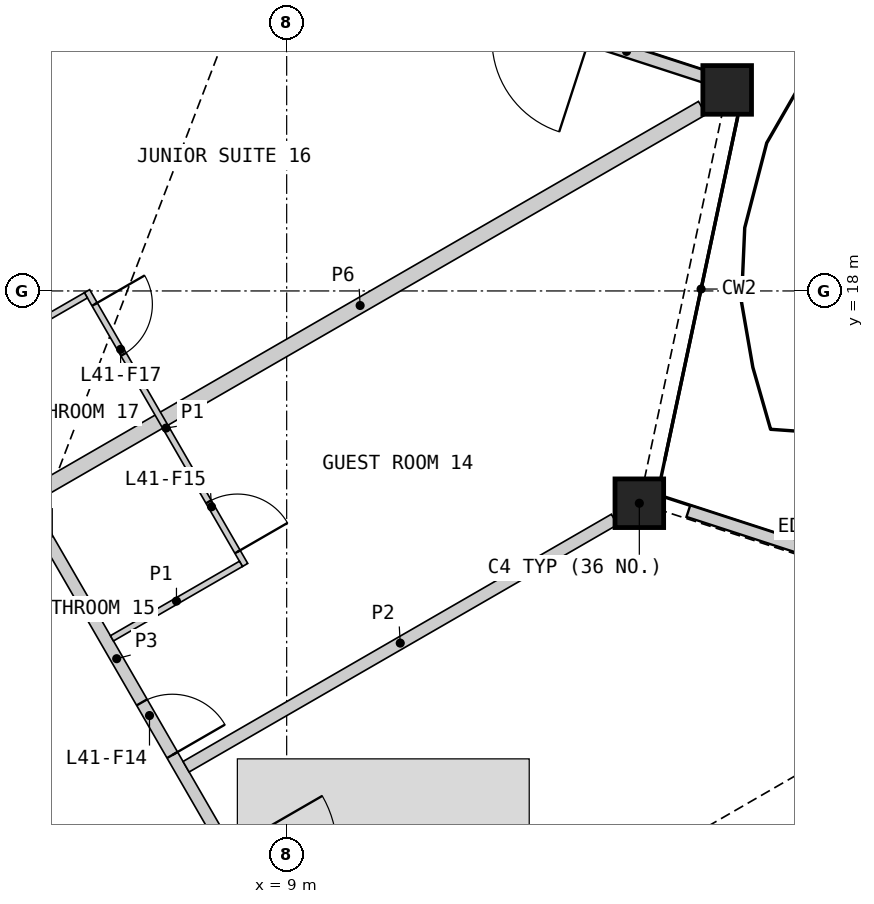
"""IFC4 building model, lengths in metres.
Left out: names, types, materials, properties, quantities, classifications, styles, units other than length and angle.
Written with IfcOpenShell. Run it as: python <this file> out.ifc"""

import sys

from ifc_helpers import new_model, si_unit, direction, frame, frame_2d, origin, origin_2d, place, context, subcontext, project, spatial, rectangle, hollow_rectangle, extrude, element, fill, save


model = new_model("IFC4")
c1 = context("Model", 3, precision=1e-05, world=origin(), true_north=direction((0.0, 1.0)))
c2 = subcontext(c1, "Body", "Model", "MODEL_VIEW")
j1 = project(units=[si_unit("LENGTHUNIT", "METRE"), si_unit("PLANEANGLEUNIT", "RADIAN")], contexts=[c1])
p1 = place(None, origin())
s1 = spatial("IfcSite", under=j1, at=p1, CompositionType="ELEMENT")
p2 = place(p1, origin())
s2 = spatial("IfcBuilding", under=s1, at=p2, CompositionType="ELEMENT")
p3 = place(p2, frame((0.0, 0.0, 190.8)))
s3 = spatial("IfcBuildingStorey", under=s2, at=p3, CompositionType="ELEMENT", Elevation=190.8)
for number, where, z_axis, x_axis in (
    (1, (14.8, 14.508, 0.0), (0.0, 0.0, 1.0), (1.0, 0.0, 0.0)),
    (2, (16.245, 21.306, 0.0), (0.0, 0.0, 1.0), (1.0, 0.0, 0.0)),
):
    element("IfcColumn", number, at=place(p3, frame(where, z_axis=z_axis, x_axis=x_axis)), inside=s3, PredefinedType="COLUMN", context=c2, shape_type="SweptSolid", body=[
        extrude(hollow_rectangle(XDim=0.8, YDim=0.8, WallThickness=0.05, at=origin_2d()), origin(), (0.0, 0.0, 1.0), 3.6),
    ])
p4 = place(p3, frame((21.102, 12.593, 0.0), z_axis=(0.0, 0.0, 1.0), x_axis=(-0.951059834965, 0.309006780371, 0.0)))
e3 = element("IfcWall", 3, at=p4, inside=s3, PredefinedType="SOLIDWALL", context=c2, shape_type="SweptSolid", body=[
    extrude(rectangle(XDim=5.779, YDim=0.2, at=frame_2d((2.889, 0.0))), origin(), (0.0, 0.0, 1.0), 2.701),
])
p5 = place(p4, frame((2.089, 0.0, 0.0)))
e4 = element("IfcOpeningElement", 4, at=p5, cuts=e3, PredefinedType="OPENING", context=c2, shape_type="SweptSolid", body=[
    extrude(rectangle(XDim=1.6, YDim=2.4, at=frame_2d((0.8, 1.2))), frame((0.0, 0.11, 0.0), z_axis=(0.0, -1.0, 0.0), x_axis=(1.0, 0.0, 0.0)), (0.0, 0.0, 1.0), 0.22),
])
p6 = place(p3, frame((15.963, 21.493, 0.0), z_axis=(0.0, 0.0, 1.0), x_axis=(-0.951059834965, 0.309006780371, 0.0)))
e5 = element("IfcWall", 5, at=p6, inside=s3, PredefinedType="SOLIDWALL", context=c2, shape_type="SweptSolid", body=[
    extrude(rectangle(XDim=5.779, YDim=0.2, at=frame_2d((2.889, 0.0))), origin(), (0.0, 0.0, 1.0), 2.701),
])
p7 = place(p6, frame((2.089, 0.0, 0.0)))
e6 = element("IfcOpeningElement", 6, at=p7, cuts=e5, PredefinedType="OPENING", context=c2, shape_type="SweptSolid", body=[
    extrude(rectangle(XDim=1.6, YDim=2.4, at=frame_2d((0.8, 1.2))), frame((0.0, 0.11, 0.0), z_axis=(0.0, -1.0, 0.0), x_axis=(1.0, 0.0, 0.0)), (0.0, 0.0, 1.0), 0.22),
])
p8 = place(p3, frame((6.875, 5.24, 0.0), z_axis=(0.0, 0.0, 1.0), x_axis=(-0.499997217876, 0.866027010039, 0.0)))
e7 = element("IfcWall", 7, at=p8, inside=s3, PredefinedType="SHEAR", context=c2, shape_type="SweptSolid", body=[
    extrude(rectangle(XDim=13.101, YDim=0.75, at=frame_2d((6.551, 0.0))), origin(), (0.0, 0.0, 1.0), 3.25),
])
p9 = place(p3, frame((4.582, 14.512, 0.0), z_axis=(0.0, 0.0, 1.0), x_axis=(0.866027263711, 0.4999967785, 0.0)))
e8 = element("IfcWall", 8, at=p9, inside=s3, PredefinedType="PARTITIONING", context=c2, shape_type="SweptSolid", body=[
    extrude(rectangle(XDim=12.994, YDim=0.25, at=frame_2d((6.497, 0.0))), origin(), (0.0, 0.0, 1.0), 2.404),
])
p10 = place(p3, frame((5.038, 13.972, 0.0), z_axis=(0.0, 0.0, 1.0), x_axis=(0.50000393355, -0.866023132736, 0.0)))
e9 = element("IfcWall", 9, at=p10, inside=s3, PredefinedType="PARTITIONING", context=c2, shape_type="SweptSolid", body=[
    extrude(rectangle(XDim=9.335, YDim=0.2, at=frame_2d((4.667, 0.0))), origin(), (0.0, 0.0, 1.0), 3.25),
])
p11 = place(p10, frame((5.979, 0.0, 0.0)))
e10 = element("IfcOpeningElement", 10, at=p11, cuts=e9, PredefinedType="OPENING", context=c2, shape_type="SweptSolid", body=[
    extrude(rectangle(XDim=1.8, YDim=2.1, at=frame_2d((0.9, 1.05))), frame((0.0, 0.11, 0.0), z_axis=(0.0, -1.0, 0.0), x_axis=(1.0, 0.0, 0.0)), (0.0, 0.0, 1.0), 0.22),
])
p12 = place(p10, frame((3.163, 0.0, 0.0)))
e11 = element("IfcOpeningElement", 11, at=p12, cuts=e9, PredefinedType="OPENING", context=c2, shape_type="SweptSolid", body=[
    extrude(rectangle(XDim=1.0, YDim=2.1, at=frame_2d((0.5, 1.05))), frame((0.0, 0.11, 0.0), z_axis=(0.0, -1.0, 0.0), x_axis=(1.0, 0.0, 0.0)), (0.0, 0.0, 1.0), 0.22),
])
p13 = place(p3, frame((2.028, 19.374, 0.0), z_axis=(0.0, 0.0, 1.0), x_axis=(0.651304244859, 0.758816697647, 0.0)))
e12 = element("IfcWall", 12, at=p13, inside=s3, PredefinedType="PARTITIONING", context=c2, shape_type="SweptSolid", body=[
    extrude(rectangle(XDim=13.795, YDim=0.2, at=frame_2d((6.897, 0.0))), origin(), (0.0, 0.0, 1.0), 2.404),
])
p14 = place(p3, frame((7.346, 10.175, 0.0), z_axis=(0.0, 0.0, 1.0), x_axis=(0.86602913801, 0.499993532075, 0.0)))
e13 = element("IfcWall", 13, at=p14, inside=s3, PredefinedType="PARTITIONING", context=c2, shape_type="SweptSolid", body=[
    extrude(rectangle(XDim=8.134, YDim=0.2, at=frame_2d((4.067, 0.0))), origin(), (0.0, 0.0, 1.0), 2.404),
])
p15 = place(p3, frame((5.717, 17.996, 0.0), z_axis=(0.0, 0.0, 1.0), x_axis=(0.500027264788, -0.866009661879, 0.0)))
e14 = element("IfcWall", 14, at=p15, inside=s3, PredefinedType="PARTITIONING", context=c2, shape_type="SweptSolid", body=[
    extrude(rectangle(XDim=5.2, YDim=0.1, at=frame_2d((2.6, 0.0))), origin(), (0.0, 0.0, 1.0), 2.404),
])
p16 = place(p15, frame((4.0, 0.0, 0.0)))
e15 = element("IfcOpeningElement", 15, at=p16, cuts=e14, PredefinedType="OPENING", context=c2, shape_type="SweptSolid", body=[
    extrude(rectangle(XDim=0.95, YDim=2.1, at=frame_2d((0.475, 1.05))), frame((0.0, 0.06, 0.0), z_axis=(0.0, -1.0, 0.0), x_axis=(1.0, 0.0, 0.0)), (0.0, 0.0, 1.0), 0.12),
])
p17 = place(p15, frame((0.25, 0.0, 0.0)))
e16 = element("IfcOpeningElement", 16, at=p17, cuts=e14, PredefinedType="OPENING", context=c2, shape_type="SweptSolid", body=[
    extrude(rectangle(XDim=0.95, YDim=2.1, at=frame_2d((0.475, 1.05))), frame((0.0, 0.06, 0.0), z_axis=(0.0, -1.0, 0.0), x_axis=(1.0, 0.0, 0.0)), (0.0, 0.0, 1.0), 0.12),
])
p18 = place(p3, frame((3.576, 16.703, 0.0), z_axis=(0.0, 0.0, 1.0), x_axis=(0.866057815567, 0.499943856944, 0.0)))
e17 = element("IfcWall", 17, at=p18, inside=s3, PredefinedType="PARTITIONING", context=c2, shape_type="SweptSolid", body=[
    extrude(rectangle(XDim=2.45, YDim=0.1, at=frame_2d((1.225, 0.0))), origin(), (0.0, 0.0, 1.0), 2.404),
])
p19 = place(p3, frame((6.126, 12.286, 0.0), z_axis=(0.0, 0.0, 1.0), x_axis=(0.866014668023, 0.500018594424, 0.0)))
e18 = element("IfcWall", 18, at=p19, inside=s3, PredefinedType="PARTITIONING", context=c2, shape_type="SweptSolid", body=[
    extrude(rectangle(XDim=2.45, YDim=0.1, at=frame_2d((1.225, 0.0))), origin(), (0.0, 0.0, 1.0), 2.404),
])
p20 = place(p12, origin())
e19 = element("IfcDoor", 19, at=p20, inside=s3, OperationType="SINGLE_SWING_RIGHT", PredefinedType="DOOR", context=c2, shape_type="SweptSolid", body=[
    extrude(rectangle(XDim=1.0, YDim=2.1, at=frame_2d((0.5, 1.05))), frame((0.0, 0.025, 0.0), z_axis=(0.0, -1.0, 0.0), x_axis=(1.0, 0.0, 0.0)), (0.0, 0.0, 1.0), 0.05),
])
fill(e11, e19)
p21 = place(p16, origin())
e20 = element("IfcDoor", 20, at=p21, inside=s3, OperationType="SINGLE_SWING_RIGHT", PredefinedType="DOOR", context=c2, shape_type="SweptSolid", body=[
    extrude(rectangle(XDim=0.95, YDim=2.1, at=frame_2d((0.475, 1.05))), frame((0.0, 0.025, 0.0), z_axis=(0.0, -1.0, 0.0), x_axis=(1.0, 0.0, 0.0)), (0.0, 0.0, 1.0), 0.05),
])
fill(e15, e20)
p22 = place(p17, origin())
e21 = element("IfcDoor", 21, at=p22, inside=s3, OperationType="SINGLE_SWING_LEFT", PredefinedType="DOOR", context=c2, shape_type="SweptSolid", body=[
    extrude(rectangle(XDim=0.95, YDim=2.1, at=frame_2d((0.475, 1.05))), frame((0.0, 0.025, 0.0), z_axis=(0.0, -1.0, 0.0), x_axis=(1.0, 0.0, 0.0)), (0.0, 0.0, 1.0), 0.05),
])
fill(e16, e21)
save(model, sys.argv[1])
